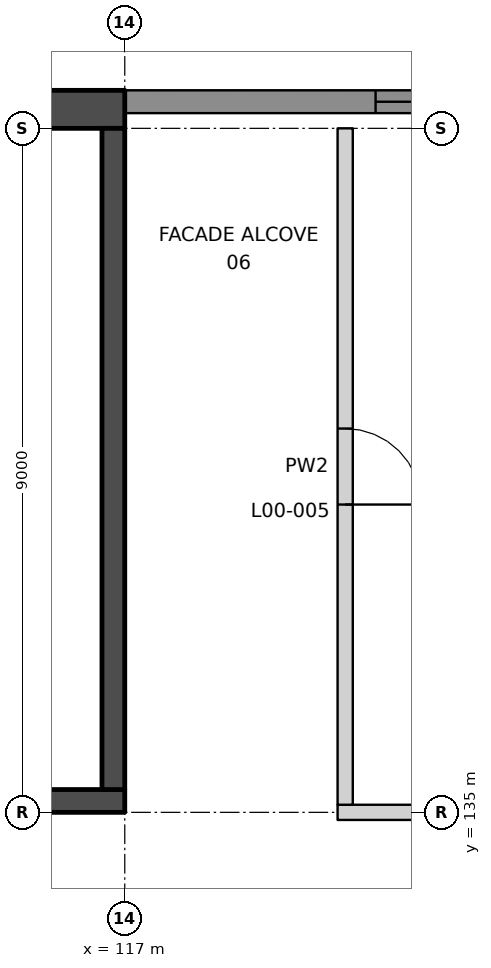
"""IFC4 building model, lengths in metres.
Left out: names, types, materials, properties, quantities, classifications, styles, units other than length and angle.
Written with IfcOpenShell. Run it as: python <this file> out.ifc"""

import sys

from ifc_helpers import new_model, si_unit, direction, frame, frame_2d, origin, place, context, subcontext, project, spatial, rectangle, extrude, element, fill, save


model = new_model("IFC4")
c1 = context("Model", 3, precision=1e-05, world=origin(), true_north=direction((0.0, 1.0)))
c2 = subcontext(c1, "Body", "Model", "MODEL_VIEW")
j1 = project(units=[si_unit("LENGTHUNIT", "METRE"), si_unit("PLANEANGLEUNIT", "RADIAN")], contexts=[c1])
p1 = place(None, origin())
s1 = spatial("IfcSite", under=j1, at=p1, CompositionType="ELEMENT")
p2 = place(p1, origin())
s2 = spatial("IfcBuilding", under=s1, at=p2, CompositionType="ELEMENT")
p3 = place(p2, origin())
s3 = spatial("IfcBuildingStorey", under=s2, at=p3, CompositionType="ELEMENT", Elevation=0.0)
p4 = place(p3, frame((119.8, 135.0, 0.0), z_axis=(0.0, 0.0, 1.0), x_axis=(1.0, 0.0, 0.0)))
e1 = element("IfcWall", 1, at=p4, inside=s3, PredefinedType="PARTITIONING", context=c2, shape_type="SweptSolid", body=[
    extrude(rectangle(XDim=5.75, YDim=0.2, at=frame_2d((2.875, 0.0))), origin(), (0.0, 0.0, 1.0), 5.75),
])
p5 = place(p3, frame((119.9, 135.1, 0.0), z_axis=(0.0, 0.0, 1.0), x_axis=(0.0, 1.0, 0.0)))
e2 = element("IfcWall", 2, at=p5, inside=s3, PredefinedType="PARTITIONING", context=c2, shape_type="SweptSolid", body=[
    extrude(rectangle(XDim=8.9, YDim=0.2, at=frame_2d((4.45, 0.0))), origin(), (0.0, 0.0, 1.0), 7.0),
])
p6 = place(p5, frame((3.95, 0.0, 0.0)))
e3 = element("IfcOpeningElement", 3, at=p6, cuts=e2, PredefinedType="OPENING", context=c2, shape_type="SweptSolid", body=[
    extrude(rectangle(XDim=1.0, YDim=2.1, at=frame_2d((0.5, 1.05))), frame((0.0, 0.11, 0.0), z_axis=(0.0, -1.0, 0.0), x_axis=(1.0, 0.0, 0.0)), (0.0, 0.0, 1.0), 0.22),
])
p7 = place(p3, frame((125.5, 144.35, 0.0), z_axis=(0.0, 0.0, 1.0), x_axis=(-1.0, 0.0, 0.0)))
e4 = element("IfcWall", 4, at=p7, inside=s3, PredefinedType="SOLIDWALL", context=c2, shape_type="SweptSolid", body=[
    extrude(rectangle(XDim=8.5, YDim=0.3, at=frame_2d((4.25, 0.0))), origin(), (0.0, 0.0, 1.0), 7.0),
])
p8 = place(p7, frame((2.8, 0.0, 0.0)))
e5 = element("IfcOpeningElement", 5, at=p8, cuts=e4, PredefinedType="OPENING", context=c2, shape_type="SweptSolid", body=[
    extrude(rectangle(XDim=2.4, YDim=2.4, at=frame_2d((1.2, 1.2))), frame((0.0, 0.16, 0.0), z_axis=(0.0, -1.0, 0.0), x_axis=(1.0, 0.0, 0.0)), (0.0, 0.0, 1.0), 0.32),
])
p9 = place(p3, frame((117.0, 135.15, 0.0), z_axis=(0.0, 0.0, 1.0), x_axis=(-1.0, 0.0, 0.0)))
e6 = element("IfcWall", 6, at=p9, inside=s3, PredefinedType="SHEAR", context=c2, shape_type="SweptSolid", body=[
    extrude(rectangle(XDim=18.0, YDim=0.3, at=frame_2d((9.0, 0.0))), origin(), (0.0, 0.0, 1.0), 7.0),
])
p10 = place(p9, frame((8.6, 0.0, 0.0)))
e7 = element("IfcOpeningElement", 7, at=p10, cuts=e6, PredefinedType="OPENING", context=c2, shape_type="SweptSolid", body=[
    extrude(rectangle(XDim=1.2, YDim=2.1, at=frame_2d((0.6, 1.05))), frame((0.0, 0.16, 0.0), z_axis=(0.0, -1.0, 0.0), x_axis=(1.0, 0.0, 0.0)), (0.0, 0.0, 1.0), 0.32),
])
p11 = place(p3, frame((117.0, 144.25, 0.0), z_axis=(0.0, 0.0, 1.0), x_axis=(-1.0, 0.0, 0.0)))
e8 = element("IfcWall", 8, at=p11, inside=s3, PredefinedType="SHEAR", context=c2, shape_type="SweptSolid", body=[
    extrude(rectangle(XDim=18.0, YDim=0.5, at=frame_2d((9.0, 0.0))), origin(), (0.0, 0.0, 1.0), 7.0),
])
p12 = place(p11, frame((7.9, 0.0, 0.0)))
e9 = element("IfcOpeningElement", 9, at=p12, cuts=e8, PredefinedType="OPENING", context=c2, shape_type="SweptSolid", body=[
    extrude(rectangle(XDim=2.6, YDim=2.4, at=frame_2d((1.3, 1.2))), frame((0.0, 0.26, 0.0), z_axis=(0.0, -1.0, 0.0), x_axis=(1.0, 0.0, 0.0)), (0.0, 0.0, 1.0), 0.52),
])
p13 = place(p3, frame((116.85, 135.3, 0.0), z_axis=(0.0, 0.0, 1.0), x_axis=(0.0, 1.0, 0.0)))
e10 = element("IfcWall", 10, at=p13, inside=s3, PredefinedType="SHEAR", context=c2, shape_type="SweptSolid", body=[
    extrude(rectangle(XDim=8.7, YDim=0.3, at=frame_2d((4.35, 0.0))), origin(), (0.0, 0.0, 1.0), 7.0),
])
p14 = place(p6, frame((1.0, 0.0, 0.0), z_axis=(0.0, 0.0, 1.0), x_axis=(-1.0, 0.0, 0.0)))
e11 = element("IfcDoor", 11, at=p14, inside=s3, OperationType="SINGLE_SWING_RIGHT", PredefinedType="DOOR", context=c2, shape_type="SweptSolid", body=[
    extrude(rectangle(XDim=1.0, YDim=2.1, at=frame_2d((0.5, 1.05))), frame((0.0, 0.025, 0.0), z_axis=(0.0, -1.0, 0.0), x_axis=(1.0, 0.0, 0.0)), (0.0, 0.0, 1.0), 0.05),
])
fill(e3, e11)
p15 = place(p8, frame((2.4, 0.0, 0.0), z_axis=(0.0, 0.0, 1.0), x_axis=(-1.0, 0.0, 0.0)))
e12 = element("IfcDoor", 12, at=p15, inside=s3, OperationType="DOUBLE_DOOR_SINGLE_SWING", PredefinedType="DOOR", context=c2, shape_type="SweptSolid", body=[
    extrude(rectangle(XDim=2.4, YDim=2.4, at=frame_2d((1.2, 1.2))), frame((0.0, 0.025, 0.0), z_axis=(0.0, -1.0, 0.0), x_axis=(1.0, 0.0, 0.0)), (0.0, 0.0, 1.0), 0.05),
])
fill(e5, e12)
save(model, sys.argv[1])
